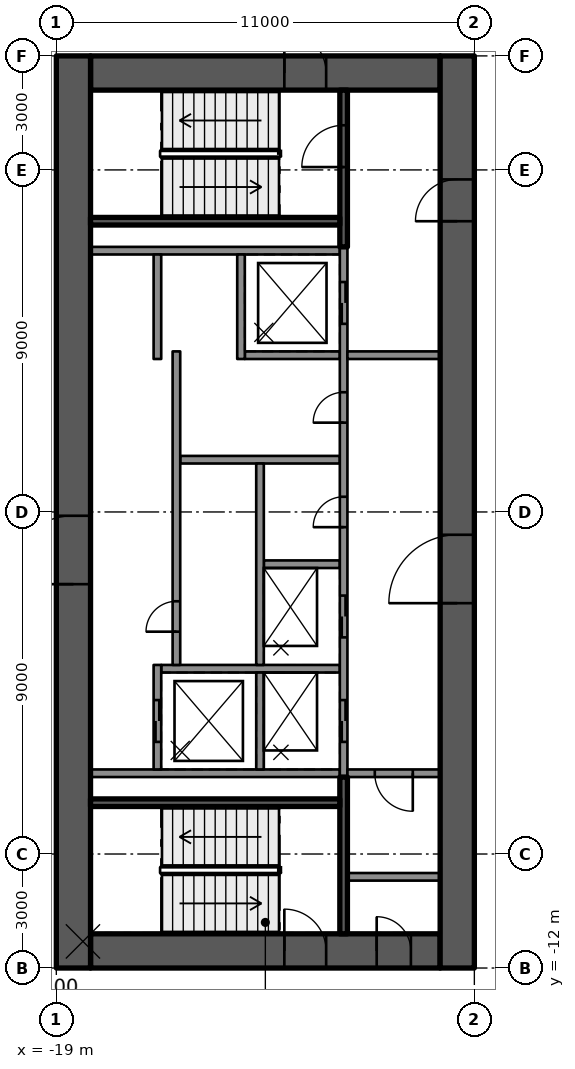
"""IFC4 building model, lengths in metres.
Left out: names, types, materials, properties, quantities, classifications, styles, units other than length and angle.
Written with IfcOpenShell. Run it as: python <this file> out.ifc"""

import sys

from ifc_helpers import new_model, si_unit, direction, frame, frame_2d, origin, place, context, subcontext, project, spatial, rectangle, extrude, element, fill, save


model = new_model("IFC4")
c1 = context("Model", 3, precision=1e-05, world=origin(), true_north=direction((0.0, 1.0)))
c2 = subcontext(c1, "Body", "Model", "MODEL_VIEW")
j1 = project(units=[si_unit("LENGTHUNIT", "METRE"), si_unit("PLANEANGLEUNIT", "RADIAN")], contexts=[c1])
p1 = place(None, origin())
s1 = spatial("IfcSite", under=j1, at=p1, CompositionType="ELEMENT")
p2 = place(p1, origin())
s2 = spatial("IfcBuilding", under=s1, at=p2, CompositionType="ELEMENT")
p3 = place(p2, frame((0.0, 0.0, 228.0)))
s3 = spatial("IfcBuildingStorey", under=s2, at=p3, CompositionType="ELEMENT", Elevation=228.0)
p4 = place(p3, frame((-18.1, 11.55, 0.0), z_axis=(0.0, 0.0, 1.0), x_axis=(1.0, 0.0, 0.0)))
e1 = element("IfcWall", 1, at=p4, inside=s3, PredefinedType="SHEAR", context=c2, shape_type="SweptSolid", body=[
    extrude(rectangle(XDim=9.2, YDim=0.9, at=frame_2d((4.6, 0.0))), origin(), (0.0, 0.0, 1.0), 4.0),
])
p5 = place(p4, frame((5.1, 0.0, 0.0)))
e2 = element("IfcOpeningElement", 2, at=p5, cuts=e1, PredefinedType="OPENING", context=c2, shape_type="SweptSolid", body=[
    extrude(rectangle(XDim=1.1, YDim=2.1, at=frame_2d((0.55, 1.05))), frame((0.0, 0.46, 0.0), z_axis=(0.0, -1.0, 0.0), x_axis=(1.0, 0.0, 0.0)), (0.0, 0.0, 1.0), 0.92),
])
p6 = place(p3, frame((-18.1, -11.55, 0.0), z_axis=(0.0, 0.0, 1.0), x_axis=(1.0, 0.0, 0.0)))
e3 = element("IfcWall", 3, at=p6, inside=s3, PredefinedType="SHEAR", context=c2, shape_type="SweptSolid", body=[
    extrude(rectangle(XDim=9.2, YDim=0.9, at=frame_2d((4.6, 0.0))), origin(), (0.0, 0.0, 1.0), 4.0),
])
p7 = place(p6, frame((5.1, 0.0, 0.0)))
e4 = element("IfcOpeningElement", 4, at=p7, cuts=e3, PredefinedType="OPENING", context=c2, shape_type="SweptSolid", body=[
    extrude(rectangle(XDim=1.1, YDim=2.1, at=frame_2d((0.55, 1.05))), frame((0.0, 0.46, 0.0), z_axis=(0.0, -1.0, 0.0), x_axis=(1.0, 0.0, 0.0)), (0.0, 0.0, 1.0), 0.92),
])
p8 = place(p6, frame((7.53, 0.0, 0.0)))
e5 = element("IfcOpeningElement", 5, at=p8, cuts=e3, PredefinedType="OPENING", context=c2, shape_type="SweptSolid", body=[
    extrude(rectangle(XDim=0.9, YDim=2.1, at=frame_2d((0.45, 1.05))), frame((0.0, 0.46, 0.0), z_axis=(0.0, -1.0, 0.0), x_axis=(1.0, 0.0, 0.0)), (0.0, 0.0, 1.0), 0.92),
])
p9 = place(p3, frame((-18.55, -12.0, 0.0), z_axis=(0.0, 0.0, 1.0), x_axis=(0.0, 1.0, 0.0)))
e6 = element("IfcWall", 6, at=p9, inside=s3, PredefinedType="SHEAR", context=c2, shape_type="SweptSolid", body=[
    extrude(rectangle(XDim=24.0, YDim=0.9, at=frame_2d((12.0, 0.0))), origin(), (0.0, 0.0, 1.0), 4.0),
])
p10 = place(p9, frame((10.1, 0.0, 0.0)))
e7 = element("IfcOpeningElement", 7, at=p10, cuts=e6, PredefinedType="OPENING", context=c2, shape_type="SweptSolid", body=[
    extrude(rectangle(XDim=1.8, YDim=2.1, at=frame_2d((0.9, 1.05))), frame((0.0, 0.46, 0.0), z_axis=(0.0, -1.0, 0.0), x_axis=(1.0, 0.0, 0.0)), (0.0, 0.0, 1.0), 0.92),
])
p11 = place(p3, frame((-8.45, -12.0, 0.0), z_axis=(0.0, 0.0, 1.0), x_axis=(0.0, 1.0, 0.0)))
e8 = element("IfcWall", 8, at=p11, inside=s3, PredefinedType="SHEAR", context=c2, shape_type="SweptSolid", body=[
    extrude(rectangle(XDim=24.0, YDim=0.9, at=frame_2d((12.0, 0.0))), origin(), (0.0, 0.0, 1.0), 4.0),
])
p12 = place(p11, frame((9.6, 0.0, 0.0)))
e9 = element("IfcOpeningElement", 9, at=p12, cuts=e8, PredefinedType="OPENING", context=c2, shape_type="SweptSolid", body=[
    extrude(rectangle(XDim=1.8, YDim=2.1, at=frame_2d((0.9, 1.05))), frame((0.0, 0.46, 0.0), z_axis=(0.0, -1.0, 0.0), x_axis=(1.0, 0.0, 0.0)), (0.0, 0.0, 1.0), 0.92),
])
p13 = place(p11, frame((19.65, 0.0, 0.0)))
e10 = element("IfcOpeningElement", 10, at=p13, cuts=e8, PredefinedType="OPENING", context=c2, shape_type="SweptSolid", body=[
    extrude(rectangle(XDim=1.1, YDim=2.1, at=frame_2d((0.55, 1.05))), frame((0.0, 0.46, 0.0), z_axis=(0.0, -1.0, 0.0), x_axis=(1.0, 0.0, 0.0)), (0.0, 0.0, 1.0), 0.92),
])
for number, where, z_axis, x_axis in (
    (11, (-11.54, 6.875, 0.0), (0.0, 0.0, 1.0), (-1.0, 0.0, 0.0)),
    (12, (-11.54, -6.875, 0.0), (0.0, 0.0, 1.0), (-1.0, 0.0, 0.0)),
):
    element("IfcWall", number, at=place(p3, frame(where, z_axis=z_axis, x_axis=x_axis)), inside=s3, PredefinedType="SOLIDWALL", context=c2, shape_type="SweptSolid", body=[
        extrude(rectangle(XDim=6.56, YDim=0.2, at=frame_2d((3.28, 0.0))), origin(), (0.0, 0.0, 1.0), 3.59),
    ])
p14 = place(p3, frame((-11.54, -4.125, 0.0), z_axis=(0.0, 0.0, 1.0), x_axis=(-1.0, 0.0, 0.0)))
e13 = element("IfcWall", 13, at=p14, inside=s3, PredefinedType="SOLIDWALL", context=c2, shape_type="SweptSolid", body=[
    extrude(rectangle(XDim=4.7, YDim=0.2, at=frame_2d((2.35, 0.0))), origin(), (0.0, 0.0, 1.0), 3.59),
])
p15 = place(p3, frame((-11.54, -1.375, 0.0), z_axis=(0.0, 0.0, 1.0), x_axis=(-1.0, 0.0, 0.0)))
e14 = element("IfcWall", 14, at=p15, inside=s3, PredefinedType="SOLIDWALL", context=c2, shape_type="SweptSolid", body=[
    extrude(rectangle(XDim=2.0, YDim=0.2, at=frame_2d((1.0, 0.0))), origin(), (0.0, 0.0, 1.0), 3.59),
])
p16 = place(p3, frame((-11.54, 1.375, 0.0), z_axis=(0.0, 0.0, 1.0), x_axis=(-1.0, 0.0, 0.0)))
e15 = element("IfcWall", 15, at=p16, inside=s3, PredefinedType="SOLIDWALL", context=c2, shape_type="SweptSolid", body=[
    extrude(rectangle(XDim=4.2, YDim=0.2, at=frame_2d((2.1, 0.0))), origin(), (0.0, 0.0, 1.0), 3.59),
])
p17 = place(p3, frame((-11.54, 4.125, 0.0), z_axis=(0.0, 0.0, 1.0), x_axis=(-1.0, 0.0, 0.0)))
e16 = element("IfcWall", 16, at=p17, inside=s3, PredefinedType="SOLIDWALL", context=c2, shape_type="SweptSolid", body=[
    extrude(rectangle(XDim=2.5, YDim=0.2, at=frame_2d((1.25, 0.0))), origin(), (0.0, 0.0, 1.0), 3.59),
])
p18 = place(p3, frame((-11.44, -6.975, 0.0), z_axis=(0.0, 0.0, 1.0), x_axis=(0.0, 1.0, 0.0)))
e17 = element("IfcWall", 17, at=p18, inside=s3, PredefinedType="SOLIDWALL", context=c2, shape_type="SweptSolid", body=[
    extrude(rectangle(XDim=13.95, YDim=0.2, at=frame_2d((6.975, 0.0))), origin(), (0.0, 0.0, 1.0), 3.59),
])
p19 = place(p18, frame((0.925, 0.0, 0.0)))
e18 = element("IfcOpeningElement", 18, at=p19, cuts=e17, PredefinedType="OPENING", context=c2, shape_type="SweptSolid", body=[
    extrude(rectangle(XDim=1.1, YDim=2.1, at=frame_2d((0.55, 1.05))), frame((0.0, 0.11, 0.0), z_axis=(0.0, -1.0, 0.0), x_axis=(1.0, 0.0, 0.0)), (0.0, 0.0, 1.0), 0.22),
])
p20 = place(p18, frame((3.675, 0.0, 0.0)))
e19 = element("IfcOpeningElement", 19, at=p20, cuts=e17, PredefinedType="OPENING", context=c2, shape_type="SweptSolid", body=[
    extrude(rectangle(XDim=1.1, YDim=2.1, at=frame_2d((0.55, 1.05))), frame((0.0, 0.11, 0.0), z_axis=(0.0, -1.0, 0.0), x_axis=(1.0, 0.0, 0.0)), (0.0, 0.0, 1.0), 0.22),
])
p21 = place(p18, frame((11.925, 0.0, 0.0)))
e20 = element("IfcOpeningElement", 20, at=p21, cuts=e17, PredefinedType="OPENING", context=c2, shape_type="SweptSolid", body=[
    extrude(rectangle(XDim=1.1, YDim=2.1, at=frame_2d((0.55, 1.05))), frame((0.0, 0.11, 0.0), z_axis=(0.0, -1.0, 0.0), x_axis=(1.0, 0.0, 0.0)), (0.0, 0.0, 1.0), 0.22),
])
p22 = place(p18, frame((6.575, 0.0, 0.0)))
e21 = element("IfcOpeningElement", 21, at=p22, cuts=e17, PredefinedType="OPENING", context=c2, shape_type="SweptSolid", body=[
    extrude(rectangle(XDim=0.8, YDim=2.1, at=frame_2d((0.4, 1.05))), frame((0.0, 0.11, 0.0), z_axis=(0.0, -1.0, 0.0), x_axis=(1.0, 0.0, 0.0)), (0.0, 0.0, 1.0), 0.22),
])
p23 = place(p18, frame((9.325, 0.0, 0.0)))
e22 = element("IfcOpeningElement", 22, at=p23, cuts=e17, PredefinedType="OPENING", context=c2, shape_type="SweptSolid", body=[
    extrude(rectangle(XDim=0.8, YDim=2.1, at=frame_2d((0.4, 1.05))), frame((0.0, 0.11, 0.0), z_axis=(0.0, -1.0, 0.0), x_axis=(1.0, 0.0, 0.0)), (0.0, 0.0, 1.0), 0.22),
])
p24 = place(p3, frame((-13.64, -6.775, 0.0), z_axis=(0.0, 0.0, 1.0), x_axis=(0.0, 1.0, 0.0)))
e23 = element("IfcWall", 23, at=p24, inside=s3, PredefinedType="SOLIDWALL", context=c2, shape_type="SweptSolid", body=[
    extrude(rectangle(XDim=2.55, YDim=0.2, at=frame_2d((1.275, 0.0))), origin(), (0.0, 0.0, 1.0), 3.59),
])
p25 = place(p3, frame((-13.64, -4.025, 0.0), z_axis=(0.0, 0.0, 1.0), x_axis=(0.0, 1.0, 0.0)))
e24 = element("IfcWall", 24, at=p25, inside=s3, PredefinedType="SOLIDWALL", context=c2, shape_type="SweptSolid", body=[
    extrude(rectangle(XDim=5.3, YDim=0.2, at=frame_2d((2.65, 0.0))), origin(), (0.0, 0.0, 1.0), 3.59),
])
p26 = place(p3, frame((-14.14, 4.025, 0.0), z_axis=(0.0, 0.0, 1.0), x_axis=(0.0, 1.0, 0.0)))
e25 = element("IfcWall", 25, at=p26, inside=s3, PredefinedType="SOLIDWALL", context=c2, shape_type="SweptSolid", body=[
    extrude(rectangle(XDim=2.75, YDim=0.2, at=frame_2d((1.375, 0.0))), origin(), (0.0, 0.0, 1.0), 3.59),
])
p27 = place(p3, frame((-16.34, -6.775, 0.0), z_axis=(0.0, 0.0, 1.0), x_axis=(0.0, 1.0, 0.0)))
e26 = element("IfcWall", 26, at=p27, inside=s3, PredefinedType="SOLIDWALL", context=c2, shape_type="SweptSolid", body=[
    extrude(rectangle(XDim=2.75, YDim=0.2, at=frame_2d((1.375, 0.0))), origin(), (0.0, 0.0, 1.0), 3.59),
])
p28 = place(p27, frame((0.725, 0.0, 0.0)))
e27 = element("IfcOpeningElement", 27, at=p28, cuts=e26, PredefinedType="OPENING", context=c2, shape_type="SweptSolid", body=[
    extrude(rectangle(XDim=1.1, YDim=2.1, at=frame_2d((0.55, 1.05))), frame((0.0, 0.11, 0.0), z_axis=(0.0, -1.0, 0.0), x_axis=(1.0, 0.0, 0.0)), (0.0, 0.0, 1.0), 0.22),
])
p29 = place(p3, frame((-15.84, -4.025, 0.0), z_axis=(0.0, 0.0, 1.0), x_axis=(0.0, 1.0, 0.0)))
e28 = element("IfcWall", 28, at=p29, inside=s3, PredefinedType="SOLIDWALL", context=c2, shape_type="SweptSolid", body=[
    extrude(rectangle(XDim=8.25, YDim=0.2, at=frame_2d((4.125, 0.0))), origin(), (0.0, 0.0, 1.0), 3.59),
])
p30 = place(p29, frame((0.875, 0.0, 0.0)))
e29 = element("IfcOpeningElement", 29, at=p30, cuts=e28, PredefinedType="OPENING", context=c2, shape_type="SweptSolid", body=[
    extrude(rectangle(XDim=0.8, YDim=2.1, at=frame_2d((0.4, 1.05))), frame((0.0, 0.11, 0.0), z_axis=(0.0, -1.0, 0.0), x_axis=(1.0, 0.0, 0.0)), (0.0, 0.0, 1.0), 0.22),
])
p31 = place(p3, frame((-16.34, 4.025, 0.0), z_axis=(0.0, 0.0, 1.0), x_axis=(0.0, 1.0, 0.0)))
e30 = element("IfcWall", 30, at=p31, inside=s3, PredefinedType="SOLIDWALL", context=c2, shape_type="SweptSolid", body=[
    extrude(rectangle(XDim=2.75, YDim=0.2, at=frame_2d((1.375, 0.0))), origin(), (0.0, 0.0, 1.0), 3.59),
])
p32 = place(p3, frame((-11.44, 6.975, 0.0), z_axis=(0.0, 0.0, 1.0), x_axis=(0.0, 1.0, 0.0)))
e31 = element("IfcWall", 31, at=p32, inside=s3, PredefinedType="SOLIDWALL", context=c2, shape_type="SweptSolid", body=[
    extrude(rectangle(XDim=4.125, YDim=0.2, at=frame_2d((2.062, 0.0))), origin(), (0.0, 0.0, 1.0), 3.59),
])
p33 = place(p32, frame((2.1, 0.0, 0.0)))
e32 = element("IfcOpeningElement", 32, at=p33, cuts=e31, PredefinedType="OPENING", context=c2, shape_type="SweptSolid", body=[
    extrude(rectangle(XDim=1.1, YDim=2.1, at=frame_2d((0.55, 1.05))), frame((0.0, 0.11, 0.0), z_axis=(0.0, -1.0, 0.0), x_axis=(1.0, 0.0, 0.0)), (0.0, 0.0, 1.0), 0.22),
])
p34 = place(p3, frame((-11.54, 7.65, 0.0), z_axis=(0.0, 0.0, 1.0), x_axis=(-1.0, 0.0, 0.0)))
e33 = element("IfcWall", 33, at=p34, inside=s3, PredefinedType="SOLIDWALL", context=c2, shape_type="SweptSolid", body=[
    extrude(rectangle(XDim=6.56, YDim=0.2, at=frame_2d((3.28, 0.0))), origin(), (0.0, 0.0, 1.0), 3.59),
])
p35 = place(p3, frame((-11.44, -11.1, 0.0), z_axis=(0.0, 0.0, 1.0), x_axis=(0.0, 1.0, 0.0)))
e34 = element("IfcWall", 34, at=p35, inside=s3, PredefinedType="SOLIDWALL", context=c2, shape_type="SweptSolid", body=[
    extrude(rectangle(XDim=4.125, YDim=0.2, at=frame_2d((2.062, 0.0))), origin(), (0.0, 0.0, 1.0), 3.59),
])
p36 = place(p3, frame((-11.54, -7.65, 0.0), z_axis=(0.0, 0.0, 1.0), x_axis=(-1.0, 0.0, 0.0)))
e35 = element("IfcWall", 35, at=p36, inside=s3, PredefinedType="SOLIDWALL", context=c2, shape_type="SweptSolid", body=[
    extrude(rectangle(XDim=6.56, YDim=0.2, at=frame_2d((3.28, 0.0))), origin(), (0.0, 0.0, 1.0), 3.59),
])
p37 = place(p3, frame((-8.9, 4.125, 0.0), z_axis=(0.0, 0.0, 1.0), x_axis=(-1.0, 0.0, 0.0)))
e36 = element("IfcWall", 36, at=p37, inside=s3, PredefinedType="PARTITIONING", context=c2, shape_type="SweptSolid", body=[
    extrude(rectangle(XDim=2.44, YDim=0.2, at=frame_2d((1.22, 0.0))), origin(), (0.0, 0.0, 1.0), 3.59),
])
p38 = place(p3, frame((-8.9, -6.875, 0.0), z_axis=(0.0, 0.0, 1.0), x_axis=(-1.0, 0.0, 0.0)))
e37 = element("IfcWall", 37, at=p38, inside=s3, PredefinedType="PARTITIONING", context=c2, shape_type="SweptSolid", body=[
    extrude(rectangle(XDim=2.44, YDim=0.2, at=frame_2d((1.22, 0.0))), origin(), (0.0, 0.0, 1.0), 3.59),
])
p39 = place(p38, frame((0.72, 0.0, 0.0)))
e38 = element("IfcOpeningElement", 38, at=p39, cuts=e37, PredefinedType="OPENING", context=c2, shape_type="SweptSolid", body=[
    extrude(rectangle(XDim=1.0, YDim=2.1, at=frame_2d((0.5, 1.05))), frame((0.0, 0.11, 0.0), z_axis=(0.0, -1.0, 0.0), x_axis=(1.0, 0.0, 0.0)), (0.0, 0.0, 1.0), 0.22),
])
p40 = place(p3, frame((-8.9, -9.6, 0.0), z_axis=(0.0, 0.0, 1.0), x_axis=(-1.0, 0.0, 0.0)))
e39 = element("IfcWall", 39, at=p40, inside=s3, PredefinedType="PARTITIONING", context=c2, shape_type="SweptSolid", body=[
    extrude(rectangle(XDim=2.44, YDim=0.2, at=frame_2d((1.22, 0.0))), origin(), (0.0, 0.0, 1.0), 3.59),
])
p41 = place(p19, origin())
e40 = element("IfcDoor", 40, at=p41, inside=s3, OperationType="DOUBLE_DOOR_SLIDING", PredefinedType="DOOR", context=c2, shape_type="SweptSolid", body=[
    extrude(rectangle(XDim=1.1, YDim=2.1, at=frame_2d((0.55, 1.05))), frame((0.0, 0.025, 0.0), z_axis=(0.0, -1.0, 0.0), x_axis=(1.0, 0.0, 0.0)), (0.0, 0.0, 1.0), 0.05),
])
fill(e18, e40)
p42 = place(p28, origin())
e41 = element("IfcDoor", 41, at=p42, inside=s3, OperationType="DOUBLE_DOOR_SLIDING", PredefinedType="DOOR", context=c2, shape_type="SweptSolid", body=[
    extrude(rectangle(XDim=1.1, YDim=2.1, at=frame_2d((0.55, 1.05))), frame((0.0, 0.025, 0.0), z_axis=(0.0, -1.0, 0.0), x_axis=(1.0, 0.0, 0.0)), (0.0, 0.0, 1.0), 0.05),
])
fill(e27, e41)
p43 = place(p20, origin())
e42 = element("IfcDoor", 42, at=p43, inside=s3, OperationType="DOUBLE_DOOR_SLIDING", PredefinedType="DOOR", context=c2, shape_type="SweptSolid", body=[
    extrude(rectangle(XDim=1.1, YDim=2.1, at=frame_2d((0.55, 1.05))), frame((0.0, 0.025, 0.0), z_axis=(0.0, -1.0, 0.0), x_axis=(1.0, 0.0, 0.0)), (0.0, 0.0, 1.0), 0.05),
])
fill(e19, e42)
p44 = place(p21, origin())
e43 = element("IfcDoor", 43, at=p44, inside=s3, OperationType="DOUBLE_DOOR_SLIDING", PredefinedType="DOOR", context=c2, shape_type="SweptSolid", body=[
    extrude(rectangle(XDim=1.1, YDim=2.1, at=frame_2d((0.55, 1.05))), frame((0.0, 0.025, 0.0), z_axis=(0.0, -1.0, 0.0), x_axis=(1.0, 0.0, 0.0)), (0.0, 0.0, 1.0), 0.05),
])
fill(e20, e43)
p45 = place(p30, origin())
e44 = element("IfcDoor", 44, at=p45, inside=s3, OperationType="SINGLE_SWING_LEFT", PredefinedType="DOOR", context=c2, shape_type="SweptSolid", body=[
    extrude(rectangle(XDim=0.8, YDim=2.1, at=frame_2d((0.4, 1.05))), frame((0.0, 0.025, 0.0), z_axis=(0.0, -1.0, 0.0), x_axis=(1.0, 0.0, 0.0)), (0.0, 0.0, 1.0), 0.05),
])
fill(e29, e44)
p46 = place(p22, origin())
e45 = element("IfcDoor", 45, at=p46, inside=s3, OperationType="SINGLE_SWING_LEFT", PredefinedType="DOOR", context=c2, shape_type="SweptSolid", body=[
    extrude(rectangle(XDim=0.8, YDim=2.1, at=frame_2d((0.4, 1.05))), frame((0.0, 0.025, 0.0), z_axis=(0.0, -1.0, 0.0), x_axis=(1.0, 0.0, 0.0)), (0.0, 0.0, 1.0), 0.05),
])
fill(e21, e45)
p47 = place(p23, origin())
e46 = element("IfcDoor", 46, at=p47, inside=s3, OperationType="SINGLE_SWING_LEFT", PredefinedType="DOOR", context=c2, shape_type="SweptSolid", body=[
    extrude(rectangle(XDim=0.8, YDim=2.1, at=frame_2d((0.4, 1.05))), frame((0.0, 0.025, 0.0), z_axis=(0.0, -1.0, 0.0), x_axis=(1.0, 0.0, 0.0)), (0.0, 0.0, 1.0), 0.05),
])
fill(e22, e46)
p48 = place(p12, origin())
e47 = element("IfcDoor", 47, at=p48, inside=s3, OperationType="SINGLE_SWING_LEFT", PredefinedType="DOOR", context=c2, shape_type="SweptSolid", body=[
    extrude(rectangle(XDim=1.8, YDim=2.1, at=frame_2d((0.9, 1.05))), frame((0.0, 0.025, 0.0), z_axis=(0.0, -1.0, 0.0), x_axis=(1.0, 0.0, 0.0)), (0.0, 0.0, 1.0), 0.05),
])
fill(e9, e47)
p49 = place(p10, origin())
e48 = element("IfcDoor", 48, at=p49, inside=s3, OperationType="SINGLE_SWING_LEFT", PredefinedType="DOOR", context=c2, shape_type="SweptSolid", body=[
    extrude(rectangle(XDim=1.8, YDim=2.1, at=frame_2d((0.9, 1.05))), frame((0.0, 0.025, 0.0), z_axis=(0.0, -1.0, 0.0), x_axis=(1.0, 0.0, 0.0)), (0.0, 0.0, 1.0), 0.05),
])
fill(e7, e48)
p50 = place(p13, origin())
e49 = element("IfcDoor", 49, at=p50, inside=s3, OperationType="SINGLE_SWING_RIGHT", PredefinedType="DOOR", context=c2, shape_type="SweptSolid", body=[
    extrude(rectangle(XDim=1.1, YDim=2.1, at=frame_2d((0.55, 1.05))), frame((0.0, 0.025, 0.0), z_axis=(0.0, -1.0, 0.0), x_axis=(1.0, 0.0, 0.0)), (0.0, 0.0, 1.0), 0.05),
])
fill(e10, e49)
p51 = place(p5, origin())
e50 = element("IfcDoor", 50, at=p51, inside=s3, OperationType="SINGLE_SWING_RIGHT", PredefinedType="DOOR", context=c2, shape_type="SweptSolid", body=[
    extrude(rectangle(XDim=1.1, YDim=2.1, at=frame_2d((0.55, 1.05))), frame((0.0, 0.025, 0.0), z_axis=(0.0, -1.0, 0.0), x_axis=(1.0, 0.0, 0.0)), (0.0, 0.0, 1.0), 0.05),
])
fill(e2, e50)
p52 = place(p7, origin())
e51 = element("IfcDoor", 51, at=p52, inside=s3, OperationType="SINGLE_SWING_RIGHT", PredefinedType="DOOR", context=c2, shape_type="SweptSolid", body=[
    extrude(rectangle(XDim=1.1, YDim=2.1, at=frame_2d((0.55, 1.05))), frame((0.0, 0.025, 0.0), z_axis=(0.0, -1.0, 0.0), x_axis=(1.0, 0.0, 0.0)), (0.0, 0.0, 1.0), 0.05),
])
fill(e4, e51)
p53 = place(p33, origin())
e52 = element("IfcDoor", 52, at=p53, inside=s3, OperationType="SINGLE_SWING_RIGHT", PredefinedType="DOOR", context=c2, shape_type="SweptSolid", body=[
    extrude(rectangle(XDim=1.1, YDim=2.1, at=frame_2d((0.55, 1.05))), frame((0.0, 0.025, 0.0), z_axis=(0.0, -1.0, 0.0), x_axis=(1.0, 0.0, 0.0)), (0.0, 0.0, 1.0), 0.05),
])
fill(e32, e52)
p54 = place(p8, origin())
e53 = element("IfcDoor", 53, at=p54, inside=s3, OperationType="SINGLE_SWING_RIGHT", PredefinedType="DOOR", context=c2, shape_type="SweptSolid", body=[
    extrude(rectangle(XDim=0.9, YDim=2.1, at=frame_2d((0.45, 1.05))), frame((0.0, 0.025, 0.0), z_axis=(0.0, -1.0, 0.0), x_axis=(1.0, 0.0, 0.0)), (0.0, 0.0, 1.0), 0.05),
])
fill(e5, e53)
p55 = place(p39, origin())
e54 = element("IfcDoor", 54, at=p55, inside=s3, OperationType="SINGLE_SWING_RIGHT", PredefinedType="DOOR", context=c2, shape_type="SweptSolid", body=[
    extrude(rectangle(XDim=1.0, YDim=2.1, at=frame_2d((0.5, 1.05))), frame((0.0, 0.025, 0.0), z_axis=(0.0, -1.0, 0.0), x_axis=(1.0, 0.0, 0.0)), (0.0, 0.0, 1.0), 0.05),
])
fill(e38, e54)
save(model, sys.argv[1])
